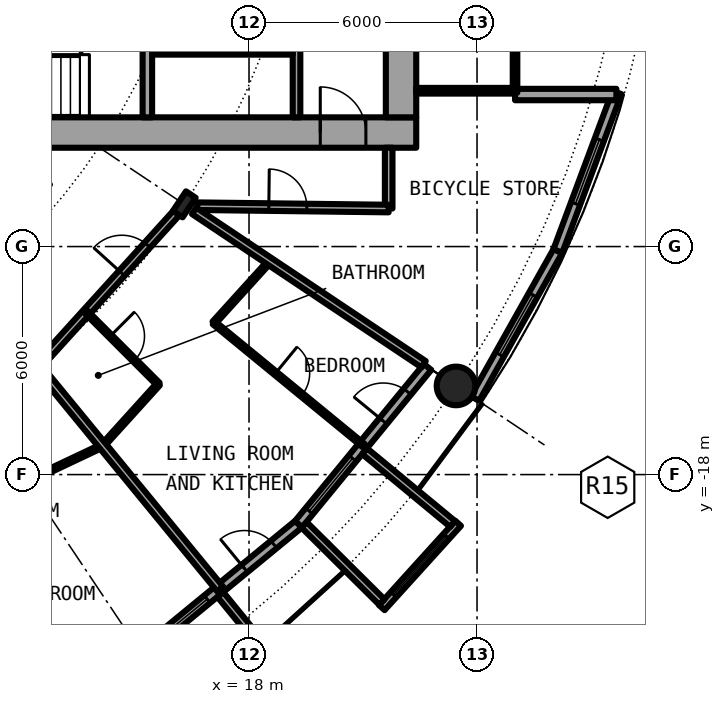
"""IFC4 building model, lengths in metres.
Left out: names, types, materials, properties, quantities, classifications, styles, units other than length and angle.
Written with IfcOpenShell. Run it as: python <this file> out.ifc"""

import sys

from ifc_helpers import new_model, si_unit, direction, frame, frame_2d, origin, origin_2d, place, context, subcontext, project, spatial, rectangle, circle, hollow_circle, i_section, extrude, element, fill, save


model = new_model("IFC4")
c1 = context("Model", 3, precision=1e-05, world=origin(), true_north=direction((0.0, 1.0)))
c2 = subcontext(c1, "Body", "Model", "MODEL_VIEW")
j1 = project(units=[si_unit("LENGTHUNIT", "METRE"), si_unit("PLANEANGLEUNIT", "RADIAN")], contexts=[c1])
p1 = place(None, origin())
s1 = spatial("IfcSite", under=j1, at=p1, CompositionType="ELEMENT")
p2 = place(p1, origin())
s2 = spatial("IfcBuilding", under=s1, at=p2, CompositionType="ELEMENT")
p3 = place(p2, frame((0.0, 0.0, 22.8)))
s3 = spatial("IfcBuildingStorey", under=s2, at=p3, CompositionType="ELEMENT", Elevation=22.8)
p4 = place(p3, frame((23.448, -15.667, 0.0), z_axis=(0.0, 0.0, 1.0), x_axis=(1.0, 0.0, 0.0)))
e1 = element("IfcColumn", 1, at=p4, inside=s3, PredefinedType="COLUMN", context=c2, shape_type="SweptSolid", body=[
    extrude(hollow_circle(Radius=0.508, WallThickness=0.05, at=origin_2d()), origin(), (0.0, 0.0, 1.0), 3.05),
])
p5 = place(p3, frame((16.297, -10.889, 0.0), z_axis=(0.0, 0.0, 1.0), x_axis=(0.831469612303, -0.55557023302, 0.0)))
e2 = element("IfcColumn", 2, at=p5, inside=s3, PredefinedType="COLUMN", context=c2, shape_type="SweptSolid", body=[
    extrude(i_section(OverallWidth=0.305, OverallDepth=0.62, WebThickness=0.021, FlangeThickness=0.04, FilletRadius=0.027, at=origin_2d()), origin(), (0.0, 0.0, 1.0), 3.05),
])
p6 = place(p3, frame((15.167, -22.699, 0.0), z_axis=(0.0, 0.0, 1.0), x_axis=(0.773019449054, 0.634382322723, 0.0)))
e3 = element("IfcWall", 3, at=p6, inside=s3, PredefinedType="SOLIDWALL", context=c2, shape_type="SweptSolid", body=[
    extrude(rectangle(XDim=5.352, YDim=0.25, at=frame_2d((2.676, 0.0))), origin(), (0.0, 0.0, 1.0), 2.7),
])
p7 = place(p6, frame((0.441, 0.0, 0.3)))
e4 = element("IfcOpeningElement", 4, at=p7, cuts=e3, PredefinedType="OPENING", context=c2, shape_type="SweptSolid", body=[
    extrude(rectangle(XDim=1.8, YDim=2.1, at=frame_2d((0.9, 1.05))), frame((0.0, 0.135, 0.0), z_axis=(0.0, -1.0, 0.0), x_axis=(1.0, 0.0, 0.0)), (0.0, 0.0, 1.0), 0.27),
])
p8 = place(p6, frame((3.51, 0.0, 0.0)))
e5 = element("IfcOpeningElement", 5, at=p8, cuts=e3, PredefinedType="OPENING", context=c2, shape_type="SweptSolid", body=[
    extrude(rectangle(XDim=1.0, YDim=2.2, at=frame_2d((0.5, 1.1))), frame((0.0, 0.135, 0.0), z_axis=(0.0, -1.0, 0.0), x_axis=(1.0, 0.0, 0.0)), (0.0, 0.0, 1.0), 0.27),
])
p9 = place(p3, frame((17.246, -21.155, -0.03), z_axis=(0.0, 0.0, 1.0), x_axis=(0.631741648902, -0.775179004516, 0.0)))
e6 = element("IfcWall", 6, at=p9, inside=s3, PredefinedType="SOLIDWALL", context=c2, shape_type="SweptSolid", body=[
    extrude(rectangle(XDim=3.006, YDim=0.2, at=frame_2d((1.503, 0.0))), origin(), (0.0, 0.0, 1.0), 2.73),
])
p10 = place(p3, frame((19.304, -19.304, 0.0), z_axis=(0.0, 0.0, 1.0), x_axis=(0.634382322723, 0.773019449054, 0.0)))
e7 = element("IfcWall", 7, at=p10, inside=s3, PredefinedType="SOLIDWALL", context=c2, shape_type="SweptSolid", body=[
    extrude(rectangle(XDim=5.352, YDim=0.25, at=frame_2d((2.676, 0.0))), origin(), (0.0, 0.0, 1.0), 2.7),
])
p11 = place(p10, frame((0.441, 0.0, 0.3)))
e8 = element("IfcOpeningElement", 8, at=p11, cuts=e7, PredefinedType="OPENING", context=c2, shape_type="SweptSolid", body=[
    extrude(rectangle(XDim=1.8, YDim=2.1, at=frame_2d((0.9, 1.05))), frame((0.0, 0.135, 0.0), z_axis=(0.0, -1.0, 0.0), x_axis=(1.0, 0.0, 0.0)), (0.0, 0.0, 1.0), 0.27),
])
p12 = place(p10, frame((3.51, 0.0, 0.0)))
e9 = element("IfcOpeningElement", 9, at=p12, cuts=e7, PredefinedType="OPENING", context=c2, shape_type="SweptSolid", body=[
    extrude(rectangle(XDim=1.0, YDim=2.2, at=frame_2d((0.5, 1.1))), frame((0.0, 0.135, 0.0), z_axis=(0.0, -1.0, 0.0), x_axis=(1.0, 0.0, 0.0)), (0.0, 0.0, 1.0), 0.27),
])
p13 = place(p3, frame((21.493, -21.5, -0.03), z_axis=(0.0, 0.0, 1.0), x_axis=(0.671506829416, 0.740998365753, 0.0)))
e10 = element("IfcWall", 10, at=p13, inside=s3, PredefinedType="SOLIDWALL", context=c2, shape_type="SweptSolid", body=[
    extrude(rectangle(XDim=2.993, YDim=0.2, at=frame_2d((1.497, 0.0))), origin(), (0.0, 0.0, 1.0), 2.73),
])
p14 = place(p13, frame((0.457, 0.0, 0.33)))
e11 = element("IfcOpeningElement", 11, at=p14, cuts=e10, PredefinedType="OPENING", context=c2, shape_type="SweptSolid", body=[
    extrude(circle(Radius=1.04, at=frame_2d((1.04, 1.04))), frame((0.0, 0.11, 0.0), z_axis=(0.0, -1.0, 0.0), x_axis=(1.0, 0.0, 0.0)), (0.0, 0.0, 1.0), 0.22),
])
p15 = place(p3, frame((19.45, -19.323, -0.03), z_axis=(0.0, 0.0, 1.0), x_axis=(0.709727076896, -0.704476739375, 0.0)))
e12 = element("IfcWall", 12, at=p15, inside=s3, PredefinedType="SOLIDWALL", context=c2, shape_type="SweptSolid", body=[
    extrude(rectangle(XDim=2.883, YDim=0.2, at=frame_2d((1.441, 0.0))), origin(), (0.0, 0.0, 1.0), 2.73),
])
p16 = place(p3, frame((21.041, -17.384, -0.03), z_axis=(0.0, 0.0, 1.0), x_axis=(0.770784861449, -0.63709551667, 0.0)))
e13 = element("IfcWall", 13, at=p16, inside=s3, PredefinedType="SOLIDWALL", context=c2, shape_type="SweptSolid", body=[
    extrude(rectangle(XDim=3.006, YDim=0.2, at=frame_2d((1.503, 0.0))), origin(), (0.0, 0.0, 1.0), 2.73),
])
p17 = place(p3, frame((23.946, -16.0, 0.0), z_axis=(0.0, 0.0, 1.0), x_axis=(0.489696356642, 0.871893042919, 0.0)))
e14 = element("IfcWall", 14, at=p17, inside=s3, PredefinedType="SOLIDWALL", context=c2, shape_type="SweptSolid", body=[
    extrude(rectangle(XDim=4.454, YDim=0.25, at=frame_2d((2.227, 0.0))), origin(), (0.0, 0.0, 1.0), 2.7),
])
p18 = place(p17, frame((1.327, 0.0, 0.3)))
e15 = element("IfcOpeningElement", 15, at=p18, cuts=e14, PredefinedType="OPENING", context=c2, shape_type="SweptSolid", body=[
    extrude(rectangle(XDim=1.8, YDim=2.1, at=frame_2d((0.9, 1.05))), frame((0.0, 0.135, 0.0), z_axis=(0.0, -1.0, 0.0), x_axis=(1.0, 0.0, 0.0)), (0.0, 0.0, 1.0), 0.27),
])
p19 = place(p3, frame((26.127, -12.117, 0.0), z_axis=(0.0, 0.0, 1.0), x_axis=(0.349247811493, 0.937030397675, 0.0)))
e16 = element("IfcWall", 16, at=p19, inside=s3, PredefinedType="SOLIDWALL", context=c2, shape_type="SweptSolid", body=[
    extrude(rectangle(XDim=4.452, YDim=0.25, at=frame_2d((2.226, 0.0))), origin(), (0.0, 0.0, 1.0), 2.7),
])
p20 = place(p19, frame((1.327, 0.0, 0.3)))
e17 = element("IfcOpeningElement", 17, at=p20, cuts=e16, PredefinedType="OPENING", context=c2, shape_type="SweptSolid", body=[
    extrude(rectangle(XDim=1.8, YDim=2.1, at=frame_2d((0.9, 1.05))), frame((0.0, 0.135, 0.0), z_axis=(0.0, -1.0, 0.0), x_axis=(1.0, 0.0, 0.0)), (0.0, 0.0, 1.0), 0.27),
])
p21 = place(p3, frame((25.0, -8.0, 0.0), z_axis=(0.0, 0.0, 1.0), x_axis=(1.0, 0.0, 0.0)))
e18 = element("IfcWall", 18, at=p21, inside=s3, PredefinedType="SOLIDWALL", context=c2, shape_type="SweptSolid", body=[
    extrude(rectangle(XDim=2.667, YDim=0.3, at=frame_2d((1.333, 0.0))), origin(), (0.0, 0.0, 1.0), 2.7),
])
p22 = place(p3, frame((8.2, -9.0, 0.0), z_axis=(0.0, 0.0, 1.0), x_axis=(1.0, 0.0, 0.0)))
e19 = element("IfcWall", 19, at=p22, inside=s3, PredefinedType="SHEAR", context=c2, shape_type="SweptSolid", body=[
    extrude(rectangle(XDim=14.2, YDim=0.8, at=frame_2d((7.1, 0.0))), origin(), (0.0, 0.0, 1.0), 3.05),
])
p23 = place(p22, frame((11.675, 0.0, 0.0)))
e20 = element("IfcOpeningElement", 20, at=p23, cuts=e19, PredefinedType="OPENING", context=c2, shape_type="SweptSolid", body=[
    extrude(rectangle(XDim=1.2, YDim=2.3, at=frame_2d((0.6, 1.15))), frame((0.0, 0.41, 0.0), z_axis=(0.0, -1.0, 0.0), x_axis=(1.0, 0.0, 0.0)), (0.0, 0.0, 1.0), 0.82),
])
p24 = place(p3, frame((22.0, 8.6, 0.0), z_axis=(0.0, 0.0, 1.0), x_axis=(0.0, -1.0, 0.0)))
e21 = element("IfcWall", 21, at=p24, inside=s3, PredefinedType="SHEAR", context=c2, shape_type="SweptSolid", body=[
    extrude(rectangle(XDim=17.2, YDim=0.8, at=frame_2d((8.6, 0.0))), origin(), (0.0, 0.0, 1.0), 3.05),
])
p25 = place(p24, frame((7.7, 0.0, 0.0)))
e22 = element("IfcOpeningElement", 22, at=p25, cuts=e21, PredefinedType="OPENING", context=c2, shape_type="SweptSolid", body=[
    extrude(rectangle(XDim=1.8, YDim=2.3, at=frame_2d((0.9, 1.15))), frame((0.0, 0.41, 0.0), z_axis=(0.0, -1.0, 0.0), x_axis=(1.0, 0.0, 0.0)), (0.0, 0.0, 1.0), 0.82),
])
p26 = place(p3, frame((15.325, -8.6, 0.0), z_axis=(0.0, 0.0, 1.0), x_axis=(0.0, 1.0, 0.0)))
e23 = element("IfcWall", 23, at=p26, inside=s3, PredefinedType="SHEAR", context=c2, shape_type="SweptSolid", body=[
    extrude(rectangle(XDim=3.95, YDim=0.25, at=frame_2d((1.975, 0.0))), origin(), (0.0, 0.0, 1.0), 3.05),
])
p27 = place(p26, frame((2.025, 0.0, 0.0)))
e24 = element("IfcOpeningElement", 24, at=p27, cuts=e23, PredefinedType="OPENING", context=c2, shape_type="SweptSolid", body=[
    extrude(rectangle(XDim=1.2, YDim=2.3, at=frame_2d((0.6, 1.15))), frame((0.0, 0.135, 0.0), z_axis=(0.0, -1.0, 0.0), x_axis=(1.0, 0.0, 0.0)), (0.0, 0.0, 1.0), 0.27),
])
p28 = place(p3, frame((19.25, -8.6, 0.0), z_axis=(0.0, 0.0, 1.0), x_axis=(0.0, 1.0, 0.0)))
e25 = element("IfcWall", 25, at=p28, inside=s3, PredefinedType="SOLIDWALL", context=c2, shape_type="SweptSolid", body=[
    extrude(rectangle(XDim=7.025, YDim=0.2, at=frame_2d((3.513, 0.0))), origin(), (0.0, 0.0, 1.0), 2.7),
])
p29 = place(p28, frame((2.35, 0.0, 0.0)))
e26 = element("IfcOpeningElement", 26, at=p29, cuts=e25, PredefinedType="OPENING", context=c2, shape_type="SweptSolid", body=[
    extrude(rectangle(XDim=1.1, YDim=2.3, at=frame_2d((0.55, 1.15))), frame((0.0, 0.11, 0.0), z_axis=(0.0, -1.0, 0.0), x_axis=(1.0, 0.0, 0.0)), (0.0, 0.0, 1.0), 0.22),
])
p30 = place(p3, frame((15.45, -6.875, 0.0), z_axis=(0.0, 0.0, 1.0), x_axis=(1.0, 0.0, 0.0)))
e27 = element("IfcWall", 27, at=p30, inside=s3, PredefinedType="PARTITIONING", context=c2, shape_type="SweptSolid", body=[
    extrude(rectangle(XDim=3.7, YDim=0.15, at=frame_2d((1.85, 0.0))), origin(), (0.0, 0.0, 1.0), 2.7),
])
p31 = place(p30, frame((1.4, 0.0, 0.0)))
e28 = element("IfcOpeningElement", 28, at=p31, cuts=e27, PredefinedType="OPENING", context=c2, shape_type="SweptSolid", body=[
    extrude(rectangle(XDim=0.9, YDim=2.3, at=frame_2d((0.45, 1.15))), frame((0.0, 0.085, 0.0), z_axis=(0.0, -1.0, 0.0), x_axis=(1.0, 0.0, 0.0)), (0.0, 0.0, 1.0), 0.17),
])
p32 = place(p3, frame((22.4, -7.9, 0.0), z_axis=(0.0, 0.0, 1.0), x_axis=(1.0, 0.0, 0.0)))
e29 = element("IfcWall", 29, at=p32, inside=s3, PredefinedType="PARTITIONING", context=c2, shape_type="SweptSolid", body=[
    extrude(rectangle(XDim=2.54, YDim=0.15, at=frame_2d((1.27, 0.0))), origin(), (0.0, 0.0, 1.0), 2.7),
])
p33 = place(p3, frame((25.0, -7.95, 0.0), z_axis=(0.0, 0.0, 1.0), x_axis=(0.0, 1.0, 0.0)))
e30 = element("IfcWall", 30, at=p33, inside=s3, PredefinedType="PARTITIONING", context=c2, shape_type="SweptSolid", body=[
    extrude(rectangle(XDim=15.9, YDim=0.12, at=frame_2d((7.95, 0.0))), origin(), (0.0, 0.0, 1.0), 2.7),
])
p34 = place(p33, frame((0.95, 0.0, 0.1)))
e31 = element("IfcOpeningElement", 31, at=p34, cuts=e30, PredefinedType="OPENING", context=c2, shape_type="SweptSolid", body=[
    extrude(rectangle(XDim=14.0, YDim=2.35, at=frame_2d((7.0, 1.175))), frame((0.0, 0.07, 0.0), z_axis=(0.0, -1.0, 0.0), x_axis=(1.0, 0.0, 0.0)), (0.0, 0.0, 1.0), 0.14),
])
p35 = place(p3, frame((14.153, -17.234, 0.0), z_axis=(0.0, 0.0, 1.0), x_axis=(0.671144831591, 0.741326254107, 0.0)))
e32 = element("IfcWall", 32, at=p35, inside=s3, PredefinedType="PARTITIONING", context=c2, shape_type="SweptSolid", body=[
    extrude(rectangle(XDim=2.181, YDim=0.1, at=frame_2d((1.091, 0.0))), origin(), (0.0, 0.0, 1.0), 2.7),
])
p36 = place(p3, frame((17.077, -14.006, 0.0), z_axis=(0.0, 0.0, 1.0), x_axis=(0.671396556615, 0.741098282123, 0.0)))
e33 = element("IfcWall", 33, at=p36, inside=s3, PredefinedType="PARTITIONING", context=c2, shape_type="SweptSolid", body=[
    extrude(rectangle(XDim=2.182, YDim=0.1, at=frame_2d((1.091, 0.0))), origin(), (0.0, 0.0, 1.0), 2.7),
])
p37 = place(p3, frame((21.675, -11.0, 0.0), z_axis=(0.0, 0.0, 1.0), x_axis=(0.0, 1.0, 0.0)))
e34 = element("IfcWall", 34, at=p37, inside=s3, PredefinedType="PARTITIONING", context=c2, shape_type="SweptSolid", body=[
    extrude(rectangle(XDim=1.6, YDim=0.2, at=frame_2d((0.8, 0.0))), origin(), (0.0, 0.0, 1.0), 2.7),
])
p38 = place(p3, frame((12.188, -18.165, 0.0), z_axis=(0.0, 0.0, 1.0), x_axis=(0.903905215872, 0.427732814639, 0.0)))
e35 = element("IfcWall", 35, at=p38, inside=s3, PredefinedType="PARTITIONING", context=c2, shape_type="SweptSolid", body=[
    extrude(rectangle(XDim=2.167, YDim=0.1, at=frame_2d((1.083, 0.0))), origin(), (0.0, 0.0, 1.0), 2.7),
])
p39 = place(p3, frame((12.434, -15.151, 0.0), z_axis=(0.0, 0.0, 1.0), x_axis=(0.671514934772, 0.740991020444, 0.0)))
e36 = element("IfcWall", 36, at=p39, inside=s3, PredefinedType="PARTITIONING", context=c2, shape_type="SweptSolid", body=[
    extrude(rectangle(XDim=5.598, YDim=0.2, at=frame_2d((2.799, 0.0))), origin(), (0.0, 0.0, 1.0), 2.38),
])
p40 = place(p39, frame((3.305, 0.0, 0.0)))
e37 = element("IfcOpeningElement", 37, at=p40, cuts=e36, PredefinedType="OPENING", context=c2, shape_type="SweptSolid", body=[
    extrude(rectangle(XDim=1.0, YDim=2.3, at=frame_2d((0.5, 1.15))), frame((0.0, 0.11, 0.0), z_axis=(0.0, -1.0, 0.0), x_axis=(1.0, 0.0, 0.0)), (0.0, 0.0, 1.0), 0.22),
])
p41 = place(p3, frame((16.637, -10.938, 0.0), z_axis=(0.0, 0.0, 1.0), x_axis=(0.99992425795, -0.012307654658, 0.0)))
e38 = element("IfcWall", 38, at=p41, inside=s3, PredefinedType="PARTITIONING", context=c2, shape_type="SweptSolid", body=[
    extrude(rectangle(XDim=5.039, YDim=0.2, at=frame_2d((2.519, 0.0))), origin(), (0.0, 0.0, 1.0), 2.7),
])
p42 = place(p41, frame((1.884, 0.0, 0.0)))
e39 = element("IfcOpeningElement", 39, at=p42, cuts=e38, PredefinedType="OPENING", context=c2, shape_type="SweptSolid", body=[
    extrude(rectangle(XDim=1.0, YDim=2.3, at=frame_2d((0.5, 1.15))), frame((0.0, 0.11, 0.0), z_axis=(0.0, -1.0, 0.0), x_axis=(1.0, 0.0, 0.0)), (0.0, 0.0, 1.0), 0.22),
])
p43 = place(p3, frame((12.432, -15.152, 0.0), z_axis=(0.0, 0.0, 1.0), x_axis=(0.634353152115, -0.77304338714, 0.0)))
e40 = element("IfcWall", 40, at=p43, inside=s3, PredefinedType="PARTITIONING", context=c2, shape_type="SweptSolid", body=[
    extrude(rectangle(XDim=7.576, YDim=0.2, at=frame_2d((3.788, 0.0))), origin(), (0.0, 0.0, 1.0), 2.7),
])
p44 = place(p3, frame((13.723, -13.729, 0.0), z_axis=(0.0, 0.0, 1.0), x_axis=(0.706741540154, -0.707471833659, 0.0)))
e41 = element("IfcWall", 41, at=p44, inside=s3, PredefinedType="PARTITIONING", context=c2, shape_type="SweptSolid", body=[
    extrude(rectangle(XDim=2.674, YDim=0.1, at=frame_2d((1.337, 0.0))), origin(), (0.0, 0.0, 1.0), 2.7),
])
p45 = place(p44, frame((0.887, 0.0, 0.0)))
e42 = element("IfcOpeningElement", 42, at=p45, cuts=e41, PredefinedType="OPENING", context=c2, shape_type="SweptSolid", body=[
    extrude(rectangle(XDim=0.9, YDim=2.3, at=frame_2d((0.45, 1.15))), frame((0.0, 0.06, 0.0), z_axis=(0.0, -1.0, 0.0), x_axis=(1.0, 0.0, 0.0)), (0.0, 0.0, 1.0), 0.12),
])
p46 = place(p3, frame((16.555, -11.061, 0.0), z_axis=(0.0, 0.0, 1.0), x_axis=(0.831465568067, -0.555576285599, 0.0)))
e43 = element("IfcWall", 43, at=p46, inside=s3, PredefinedType="PARTITIONING", context=c2, shape_type="SweptSolid", body=[
    extrude(rectangle(XDim=7.264, YDim=0.2, at=frame_2d((3.632, 0.0))), origin(), (0.0, 0.0, 1.0), 2.7),
])
p47 = place(p3, frame((17.077, -14.006, 0.0), z_axis=(0.0, 0.0, 1.0), x_axis=(0.77326214499, -0.634086472908, 0.0)))
e44 = element("IfcWall", 44, at=p47, inside=s3, PredefinedType="PARTITIONING", context=c2, shape_type="SweptSolid", body=[
    extrude(rectangle(XDim=5.089, YDim=0.1, at=frame_2d((2.544, 0.0))), origin(), (0.0, 0.0, 1.0), 2.7),
])
p48 = place(p47, frame((2.094, 0.0, 0.0)))
e45 = element("IfcOpeningElement", 45, at=p48, cuts=e44, PredefinedType="OPENING", context=c2, shape_type="SweptSolid", body=[
    extrude(rectangle(XDim=0.9, YDim=2.3, at=frame_2d((0.45, 1.15))), frame((0.0, 0.06, 0.0), z_axis=(0.0, -1.0, 0.0), x_axis=(1.0, 0.0, 0.0)), (0.0, 0.0, 1.0), 0.12),
])
p49 = place(p7, origin())
e46 = element("IfcWindow", 46, at=p49, inside=s3, PartitioningType="SINGLE_PANEL", PredefinedType="WINDOW", context=c2, shape_type="SweptSolid", body=[
    extrude(rectangle(XDim=1.8, YDim=2.1, at=frame_2d((0.9, 1.05))), frame((0.0, 0.03, 0.0), z_axis=(0.0, -1.0, 0.0), x_axis=(1.0, 0.0, 0.0)), (0.0, 0.0, 1.0), 0.06),
])
fill(e4, e46)
p50 = place(p8, origin())
e47 = element("IfcDoor", 47, at=p50, inside=s3, OperationType="SINGLE_SWING_LEFT", PredefinedType="DOOR", context=c2, shape_type="SweptSolid", body=[
    extrude(rectangle(XDim=1.0, YDim=2.2, at=frame_2d((0.5, 1.1))), frame((0.0, 0.025, 0.0), z_axis=(0.0, -1.0, 0.0), x_axis=(1.0, 0.0, 0.0)), (0.0, 0.0, 1.0), 0.05),
])
fill(e5, e47)
p51 = place(p11, origin())
e48 = element("IfcWindow", 48, at=p51, inside=s3, PartitioningType="SINGLE_PANEL", PredefinedType="WINDOW", context=c2, shape_type="SweptSolid", body=[
    extrude(rectangle(XDim=1.8, YDim=2.1, at=frame_2d((0.9, 1.05))), frame((0.0, 0.03, 0.0), z_axis=(0.0, -1.0, 0.0), x_axis=(1.0, 0.0, 0.0)), (0.0, 0.0, 1.0), 0.06),
])
fill(e8, e48)
p52 = place(p14, origin())
e49 = element("IfcWindow", 49, at=p52, inside=s3, PartitioningType="SINGLE_PANEL", PredefinedType="WINDOW", context=c2, shape_type="SweptSolid", body=[
    extrude(circle(Radius=1.04, at=frame_2d((1.04, 1.04))), frame((0.0, 0.03, 0.0), z_axis=(0.0, -1.0, 0.0), x_axis=(1.0, 0.0, 0.0)), (0.0, 0.0, 1.0), 0.06),
])
fill(e11, e49)
p53 = place(p12, origin())
e50 = element("IfcDoor", 50, at=p53, inside=s3, OperationType="SINGLE_SWING_LEFT", PredefinedType="DOOR", context=c2, shape_type="SweptSolid", body=[
    extrude(rectangle(XDim=1.0, YDim=2.2, at=frame_2d((0.5, 1.1))), frame((0.0, 0.025, 0.0), z_axis=(0.0, -1.0, 0.0), x_axis=(1.0, 0.0, 0.0)), (0.0, 0.0, 1.0), 0.05),
])
fill(e9, e50)
p54 = place(p18, origin())
e51 = element("IfcWindow", 51, at=p54, inside=s3, PartitioningType="SINGLE_PANEL", PredefinedType="WINDOW", context=c2, shape_type="SweptSolid", body=[
    extrude(rectangle(XDim=1.8, YDim=2.1, at=frame_2d((0.9, 1.05))), frame((0.0, 0.03, 0.0), z_axis=(0.0, -1.0, 0.0), x_axis=(1.0, 0.0, 0.0)), (0.0, 0.0, 1.0), 0.06),
])
fill(e15, e51)
p55 = place(p20, origin())
e52 = element("IfcWindow", 52, at=p55, inside=s3, PartitioningType="SINGLE_PANEL", PredefinedType="WINDOW", context=c2, shape_type="SweptSolid", body=[
    extrude(rectangle(XDim=1.8, YDim=2.1, at=frame_2d((0.9, 1.05))), frame((0.0, 0.03, 0.0), z_axis=(0.0, -1.0, 0.0), x_axis=(1.0, 0.0, 0.0)), (0.0, 0.0, 1.0), 0.06),
])
fill(e17, e52)
p56 = place(p31, origin())
e53 = element("IfcDoor", 53, at=p56, inside=s3, OperationType="SINGLE_SWING_LEFT", PredefinedType="DOOR", context=c2, shape_type="SweptSolid", body=[
    extrude(rectangle(XDim=0.9, YDim=2.3, at=frame_2d((0.45, 1.15))), frame((0.0, 0.025, 0.0), z_axis=(0.0, -1.0, 0.0), x_axis=(1.0, 0.0, 0.0)), (0.0, 0.0, 1.0), 0.05),
])
fill(e28, e53)
p57 = place(p23, origin())
e54 = element("IfcDoor", 54, at=p57, inside=s3, OperationType="SINGLE_SWING_LEFT", PredefinedType="DOOR", context=c2, shape_type="SweptSolid", body=[
    extrude(rectangle(XDim=1.2, YDim=2.3, at=frame_2d((0.6, 1.15))), frame((0.0, 0.025, 0.0), z_axis=(0.0, -1.0, 0.0), x_axis=(1.0, 0.0, 0.0)), (0.0, 0.0, 1.0), 0.05),
])
fill(e20, e54)
p58 = place(p34, origin())
e55 = element("IfcWindow", 55, at=p58, inside=s3, PartitioningType="SINGLE_PANEL", PredefinedType="WINDOW", context=c2, shape_type="SweptSolid", body=[
    extrude(rectangle(XDim=14.0, YDim=2.35, at=frame_2d((7.0, 1.175))), frame((0.0, 0.03, 0.0), z_axis=(0.0, -1.0, 0.0), x_axis=(1.0, 0.0, 0.0)), (0.0, 0.0, 1.0), 0.06),
])
fill(e31, e55)
p59 = place(p40, origin())
e56 = element("IfcDoor", 56, at=p59, inside=s3, OperationType="SINGLE_SWING_RIGHT", PredefinedType="DOOR", context=c2, shape_type="SweptSolid", body=[
    extrude(rectangle(XDim=1.0, YDim=2.3, at=frame_2d((0.5, 1.15))), frame((0.0, 0.025, 0.0), z_axis=(0.0, -1.0, 0.0), x_axis=(1.0, 0.0, 0.0)), (0.0, 0.0, 1.0), 0.05),
])
fill(e37, e56)
p60 = place(p45, origin())
e57 = element("IfcDoor", 57, at=p60, inside=s3, OperationType="SINGLE_SWING_RIGHT", PredefinedType="DOOR", context=c2, shape_type="SweptSolid", body=[
    extrude(rectangle(XDim=0.9, YDim=2.3, at=frame_2d((0.45, 1.15))), frame((0.0, 0.025, 0.0), z_axis=(0.0, -1.0, 0.0), x_axis=(1.0, 0.0, 0.0)), (0.0, 0.0, 1.0), 0.05),
])
fill(e42, e57)
p61 = place(p48, origin())
e58 = element("IfcDoor", 58, at=p61, inside=s3, OperationType="SINGLE_SWING_LEFT", PredefinedType="DOOR", context=c2, shape_type="SweptSolid", body=[
    extrude(rectangle(XDim=0.9, YDim=2.3, at=frame_2d((0.45, 1.15))), frame((0.0, 0.025, 0.0), z_axis=(0.0, -1.0, 0.0), x_axis=(1.0, 0.0, 0.0)), (0.0, 0.0, 1.0), 0.05),
])
fill(e45, e58)
p62 = place(p42, origin())
e59 = element("IfcDoor", 59, at=p62, inside=s3, OperationType="SINGLE_SWING_LEFT", PredefinedType="DOOR", context=c2, shape_type="SweptSolid", body=[
    extrude(rectangle(XDim=1.0, YDim=2.3, at=frame_2d((0.5, 1.15))), frame((0.0, 0.025, 0.0), z_axis=(0.0, -1.0, 0.0), x_axis=(1.0, 0.0, 0.0)), (0.0, 0.0, 1.0), 0.05),
])
fill(e39, e59)
save(model, sys.argv[1])
